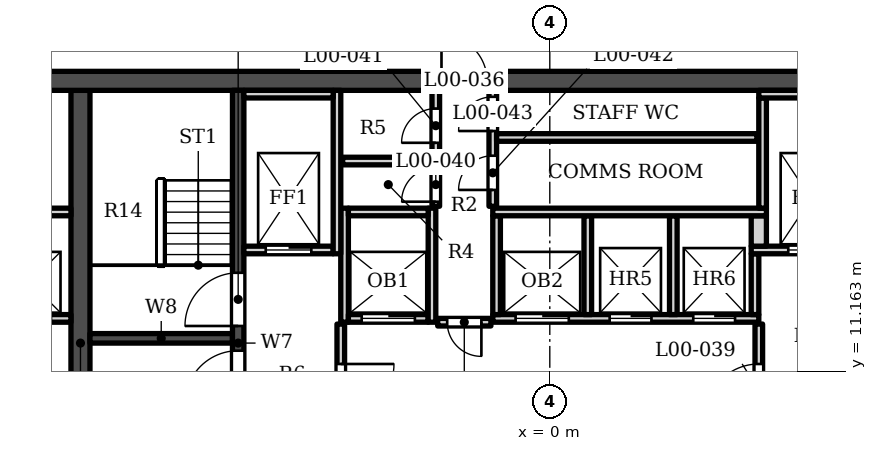
"""IFC4 building model, lengths in metres.
Left out: names, types, materials, properties, quantities, classifications, styles, units other than length and angle.
Written with IfcOpenShell. Run it as: python <this file> out.ifc"""

import sys

from ifc_helpers import new_model, si_unit, direction, frame, frame_2d, origin, place, context, subcontext, project, spatial, rectangle, extrude, element, fill, save


model = new_model("IFC4")
c1 = context("Model", 3, precision=1e-05, world=origin(), true_north=direction((0.0, 1.0)))
c2 = subcontext(c1, "Body", "Model", "MODEL_VIEW")
j1 = project(units=[si_unit("LENGTHUNIT", "METRE"), si_unit("PLANEANGLEUNIT", "RADIAN")], contexts=[c1])
p1 = place(None, origin())
s1 = spatial("IfcSite", under=j1, at=p1, CompositionType="ELEMENT")
p2 = place(p1, origin())
s2 = spatial("IfcBuilding", under=s1, at=p2, CompositionType="ELEMENT")
p3 = place(p2, origin())
s3 = spatial("IfcBuildingStorey", under=s2, at=p3, CompositionType="ELEMENT", Elevation=0.0)
p4 = place(p3, frame((-16.9, 18.802, 0.0), z_axis=(0.0, 0.0, 1.0), x_axis=(1.0, 0.0, 0.0)))
e1 = element("IfcWall", 1, at=p4, inside=s3, PredefinedType="SHEAR", context=c2, shape_type="SweptSolid", body=[
    extrude(rectangle(XDim=33.8, YDim=0.5, at=frame_2d((16.9, 0.0))), origin(), (0.0, 0.0, 1.0), 9.0),
])
p5 = place(p4, frame((14.05, 0.0, 0.0)))
e2 = element("IfcOpeningElement", 2, at=p5, cuts=e1, PredefinedType="OPENING", context=c2, shape_type="SweptSolid", body=[
    extrude(rectangle(XDim=1.2, YDim=2.1, at=frame_2d((0.6, 1.05))), frame((0.0, 0.26, 0.0), z_axis=(0.0, -1.0, 0.0), x_axis=(1.0, 0.0, 0.0)), (0.0, 0.0, 1.0), 0.52),
])
p6 = place(p3, frame((-12.35, 5.253, 0.0), z_axis=(0.0, 0.0, 1.0), x_axis=(0.0, 1.0, 0.0)))
e3 = element("IfcWall", 3, at=p6, inside=s3, PredefinedType="SHEAR", context=c2, shape_type="SweptSolid", body=[
    extrude(rectangle(XDim=13.3, YDim=0.5, at=frame_2d((6.65, 0.0))), origin(), (0.0, 0.0, 1.0), 9.0),
])
p7 = place(p3, frame((-8.2, 5.253, 0.0), z_axis=(0.0, 0.0, 1.0), x_axis=(0.0, 1.0, 0.0)))
e4 = element("IfcWall", 4, at=p7, inside=s3, PredefinedType="SHEAR", context=c2, shape_type="SweptSolid", body=[
    extrude(rectangle(XDim=13.3, YDim=0.3, at=frame_2d((6.65, 0.0))), origin(), (0.0, 0.0, 1.0), 9.0),
])
p8 = place(p7, frame((7.1, 0.0, 0.0)))
e5 = element("IfcOpeningElement", 5, at=p8, cuts=e4, PredefinedType="OPENING", context=c2, shape_type="SweptSolid", body=[
    extrude(rectangle(XDim=1.4, YDim=2.1, at=frame_2d((0.7, 1.05))), frame((0.0, 0.16, 0.0), z_axis=(0.0, -1.0, 0.0), x_axis=(1.0, 0.0, 0.0)), (0.0, 0.0, 1.0), 0.32),
])
p9 = place(p7, frame((5.05, 0.0, 0.0)))
e6 = element("IfcOpeningElement", 6, at=p9, cuts=e4, PredefinedType="OPENING", context=c2, shape_type="SweptSolid", body=[
    extrude(rectangle(XDim=1.4, YDim=2.1, at=frame_2d((0.7, 1.05))), frame((0.0, 0.16, 0.0), z_axis=(0.0, -1.0, 0.0), x_axis=(1.0, 0.0, 0.0)), (0.0, 0.0, 1.0), 0.32),
])
p10 = place(p3, frame((-12.1, 12.028, 0.0), z_axis=(0.0, 0.0, 1.0), x_axis=(1.0, 0.0, 0.0)))
e7 = element("IfcWall", 7, at=p10, inside=s3, PredefinedType="SHEAR", context=c2, shape_type="SweptSolid", body=[
    extrude(rectangle(XDim=3.75, YDim=0.25, at=frame_2d((1.875, 0.0))), origin(), (0.0, 0.0, 1.0), 9.0),
])
p11 = place(p3, frame((-5.5, 9.103, 0.0), z_axis=(0.0, 0.0, 1.0), x_axis=(0.0, 1.0, 0.0)))
e8 = element("IfcWall", 8, at=p11, inside=s3, PredefinedType="SOLIDWALL", context=c2, shape_type="SweptSolid", body=[
    extrude(rectangle(XDim=3.3, YDim=0.2, at=frame_2d((1.65, 0.0))), origin(), (0.0, 0.0, 1.0), 8.5),
])
p12 = place(p11, frame((0.85, 0.0, 0.0)))
e9 = element("IfcOpeningElement", 9, at=p12, cuts=e8, PredefinedType="OPENING", context=c2, shape_type="SweptSolid", body=[
    extrude(rectangle(XDim=1.4, YDim=2.1, at=frame_2d((0.7, 1.05))), frame((0.0, 0.11, 0.0), z_axis=(0.0, -1.0, 0.0), x_axis=(1.0, 0.0, 0.0)), (0.0, 0.0, 1.0), 0.22),
])
p13 = place(p3, frame((5.5, 9.103, 0.0), z_axis=(0.0, 0.0, 1.0), x_axis=(0.0, 1.0, 0.0)))
e10 = element("IfcWall", 10, at=p13, inside=s3, PredefinedType="SOLIDWALL", context=c2, shape_type="SweptSolid", body=[
    extrude(rectangle(XDim=3.3, YDim=0.2, at=frame_2d((1.65, 0.0))), origin(), (0.0, 0.0, 1.0), 8.5),
])
p14 = place(p13, frame((0.85, 0.0, 0.0)))
e11 = element("IfcOpeningElement", 11, at=p14, cuts=e10, PredefinedType="OPENING", context=c2, shape_type="SweptSolid", body=[
    extrude(rectangle(XDim=1.4, YDim=2.1, at=frame_2d((0.7, 1.05))), frame((0.0, 0.11, 0.0), z_axis=(0.0, -1.0, 0.0), x_axis=(1.0, 0.0, 0.0)), (0.0, 0.0, 1.0), 0.22),
])
p15 = place(p3, frame((-2.95, 12.453, 0.0), z_axis=(0.0, 0.0, 1.0), x_axis=(1.0, 0.0, 0.0)))
e12 = element("IfcWall", 12, at=p15, inside=s3, PredefinedType="SOLIDWALL", context=c2, shape_type="SweptSolid", body=[
    extrude(rectangle(XDim=1.4, YDim=0.2, at=frame_2d((0.7, 0.0))), origin(), (0.0, 0.0, 1.0), 8.5),
])
p16 = place(p15, frame((0.25, 0.0, 0.0)))
e13 = element("IfcOpeningElement", 13, at=p16, cuts=e12, PredefinedType="OPENING", context=c2, shape_type="SweptSolid", body=[
    extrude(rectangle(XDim=0.9, YDim=2.1, at=frame_2d((0.45, 1.05))), frame((0.0, 0.11, 0.0), z_axis=(0.0, -1.0, 0.0), x_axis=(1.0, 0.0, 0.0)), (0.0, 0.0, 1.0), 0.22),
])
p17 = place(p3, frame((-16.9, 12.552, 0.0), z_axis=(0.0, 0.0, 1.0), x_axis=(1.0, 0.0, 0.0)))
e14 = element("IfcWall", 14, at=p17, inside=s3, PredefinedType="SOLIDWALL", context=c2, shape_type="SweptSolid", body=[
    extrude(rectangle(XDim=4.3, YDim=0.2, at=frame_2d((2.15, 0.0))), origin(), (0.0, 0.0, 1.0), 8.5),
])
p18 = place(p17, frame((2.675, 0.0, 0.0)))
e15 = element("IfcOpeningElement", 15, at=p18, cuts=e14, PredefinedType="OPENING", context=c2, shape_type="SweptSolid", body=[
    extrude(rectangle(XDim=1.1, YDim=2.1, at=frame_2d((0.55, 1.05))), frame((0.0, 0.11, 0.0), z_axis=(0.0, -1.0, 0.0), x_axis=(1.0, 0.0, 0.0)), (0.0, 0.0, 1.0), 0.22),
])
p19 = place(p17, frame((0.425, 0.0, 0.0)))
e16 = element("IfcOpeningElement", 16, at=p19, cuts=e14, PredefinedType="OPENING", context=c2, shape_type="SweptSolid", body=[
    extrude(rectangle(XDim=1.1, YDim=2.1, at=frame_2d((0.55, 1.05))), frame((0.0, 0.11, 0.0), z_axis=(0.0, -1.0, 0.0), x_axis=(1.0, 0.0, 0.0)), (0.0, 0.0, 1.0), 0.22),
])
p20 = place(p3, frame((-5.4, 12.453, 0.0), z_axis=(0.0, 0.0, 1.0), x_axis=(0.0, 1.0, 0.0)))
e17 = element("IfcWall", 17, at=p20, inside=s3, PredefinedType="SOLIDWALL", context=c2, shape_type="SweptSolid", body=[
    extrude(rectangle(XDim=3.0, YDim=0.2, at=frame_2d((1.5, 0.0))), origin(), (0.0, 0.0, 1.0), 8.5),
])
p21 = place(p3, frame((-5.3, 12.552, 0.0), z_axis=(0.0, 0.0, 1.0), x_axis=(1.0, 0.0, 0.0)))
e18 = element("IfcWall", 18, at=p21, inside=s3, PredefinedType="SOLIDWALL", context=c2, shape_type="SweptSolid", body=[
    extrude(rectangle(XDim=2.1, YDim=0.2, at=frame_2d((1.05, 0.0))), origin(), (0.0, 0.0, 1.0), 8.5),
])
p22 = place(p21, frame((0.35, 0.0, 0.0)))
e19 = element("IfcOpeningElement", 19, at=p22, cuts=e18, PredefinedType="OPENING", context=c2, shape_type="SweptSolid", body=[
    extrude(rectangle(XDim=1.4, YDim=2.4, at=frame_2d((0.7, 1.2))), frame((0.0, 0.11, 0.0), z_axis=(0.0, -1.0, 0.0), x_axis=(1.0, 0.0, 0.0)), (0.0, 0.0, 1.0), 0.22),
])
p23 = place(p3, frame((-3.1, 12.453, 0.0), z_axis=(0.0, 0.0, 1.0), x_axis=(0.0, 1.0, 0.0)))
e20 = element("IfcWall", 20, at=p23, inside=s3, PredefinedType="SOLIDWALL", context=c2, shape_type="SweptSolid", body=[
    extrude(rectangle(XDim=3.0, YDim=0.2, at=frame_2d((1.5, 0.0))), origin(), (0.0, 0.0, 1.0), 8.5),
])
p24 = place(p3, frame((-1.5, 12.552, 0.0), z_axis=(0.0, 0.0, 1.0), x_axis=(1.0, 0.0, 0.0)))
e21 = element("IfcWall", 21, at=p24, inside=s3, PredefinedType="SOLIDWALL", context=c2, shape_type="SweptSolid", body=[
    extrude(rectangle(XDim=7.0, YDim=0.2, at=frame_2d((3.5, 0.0))), origin(), (0.0, 0.0, 1.0), 8.5),
])
p25 = place(p24, frame((0.6, 0.0, 0.0)))
e22 = element("IfcOpeningElement", 22, at=p25, cuts=e21, PredefinedType="OPENING", context=c2, shape_type="SweptSolid", body=[
    extrude(rectangle(XDim=1.4, YDim=2.4, at=frame_2d((0.7, 1.2))), frame((0.0, 0.11, 0.0), z_axis=(0.0, -1.0, 0.0), x_axis=(1.0, 0.0, 0.0)), (0.0, 0.0, 1.0), 0.22),
])
p26 = place(p24, frame((3.075, 0.0, 0.0)))
e23 = element("IfcOpeningElement", 23, at=p26, cuts=e21, PredefinedType="OPENING", context=c2, shape_type="SweptSolid", body=[
    extrude(rectangle(XDim=1.1, YDim=2.1, at=frame_2d((0.55, 1.05))), frame((0.0, 0.11, 0.0), z_axis=(0.0, -1.0, 0.0), x_axis=(1.0, 0.0, 0.0)), (0.0, 0.0, 1.0), 0.22),
])
p27 = place(p24, frame((5.275, 0.0, 0.0)))
e24 = element("IfcOpeningElement", 24, at=p27, cuts=e21, PredefinedType="OPENING", context=c2, shape_type="SweptSolid", body=[
    extrude(rectangle(XDim=1.1, YDim=2.1, at=frame_2d((0.55, 1.05))), frame((0.0, 0.11, 0.0), z_axis=(0.0, -1.0, 0.0), x_axis=(1.0, 0.0, 0.0)), (0.0, 0.0, 1.0), 0.22),
])
for number, where, z_axis, x_axis in (
    (25, (-1.4, 12.653, 0.0), (0.0, 0.0, 1.0), (0.0, 1.0, 0.0)),
    (26, (1.0, 12.653, 0.0), (0.0, 0.0, 1.0), (0.0, 1.0, 0.0)),
    (27, (3.25, 12.653, 0.0), (0.0, 0.0, 1.0), (0.0, 1.0, 0.0)),
):
    element("IfcWall", number, at=place(p3, frame(where, z_axis=z_axis, x_axis=x_axis)), inside=s3, PredefinedType="SOLIDWALL", context=c2, shape_type="SweptSolid", body=[
        extrude(rectangle(XDim=2.6, YDim=0.2, at=frame_2d((1.3, 0.0))), origin(), (0.0, 0.0, 1.0), 8.5),
    ])
p28 = place(p3, frame((5.4, 12.653, 0.0), z_axis=(0.0, 0.0, 1.0), x_axis=(0.0, 1.0, 0.0)))
e28 = element("IfcWall", 28, at=p28, inside=s3, PredefinedType="SOLIDWALL", context=c2, shape_type="SweptSolid", body=[
    extrude(rectangle(XDim=1.6, YDim=0.2, at=frame_2d((0.8, 0.0))), origin(), (0.0, 0.0, 1.0), 8.5),
])
p29 = place(p3, frame((-8.05, 14.353, 0.0), z_axis=(0.0, 0.0, 1.0), x_axis=(1.0, 0.0, 0.0)))
e29 = element("IfcWall", 29, at=p29, inside=s3, PredefinedType="SOLIDWALL", context=c2, shape_type="SweptSolid", body=[
    extrude(rectangle(XDim=2.35, YDim=0.2, at=frame_2d((1.175, 0.0))), origin(), (0.0, 0.0, 1.0), 8.5),
])
p30 = place(p29, frame((0.575, 0.0, 0.0)))
e30 = element("IfcOpeningElement", 30, at=p30, cuts=e29, PredefinedType="OPENING", context=c2, shape_type="SweptSolid", body=[
    extrude(rectangle(XDim=1.2, YDim=2.1, at=frame_2d((0.6, 1.05))), frame((0.0, 0.11, 0.0), z_axis=(0.0, -1.0, 0.0), x_axis=(1.0, 0.0, 0.0)), (0.0, 0.0, 1.0), 0.22),
])
p31 = place(p3, frame((-5.6, 14.253, 0.0), z_axis=(0.0, 0.0, 1.0), x_axis=(0.0, 1.0, 0.0)))
e31 = element("IfcWall", 31, at=p31, inside=s3, PredefinedType="SOLIDWALL", context=c2, shape_type="SweptSolid", body=[
    extrude(rectangle(XDim=4.3, YDim=0.2, at=frame_2d((2.15, 0.0))), origin(), (0.0, 0.0, 1.0), 8.5),
])
p32 = place(p3, frame((5.3, 14.353, 0.0), z_axis=(0.0, 0.0, 1.0), x_axis=(1.0, 0.0, 0.0)))
e32 = element("IfcWall", 32, at=p32, inside=s3, PredefinedType="SOLIDWALL", context=c2, shape_type="SweptSolid", body=[
    extrude(rectangle(XDim=2.75, YDim=0.2, at=frame_2d((1.375, 0.0))), origin(), (0.0, 0.0, 1.0), 8.5),
])
p33 = place(p32, frame((0.975, 0.0, 0.0)))
e33 = element("IfcOpeningElement", 33, at=p33, cuts=e32, PredefinedType="OPENING", context=c2, shape_type="SweptSolid", body=[
    extrude(rectangle(XDim=1.2, YDim=2.1, at=frame_2d((0.6, 1.05))), frame((0.0, 0.11, 0.0), z_axis=(0.0, -1.0, 0.0), x_axis=(1.0, 0.0, 0.0)), (0.0, 0.0, 1.0), 0.22),
])
p34 = place(p3, frame((5.5, 14.453, 0.0), z_axis=(0.0, 0.0, 1.0), x_axis=(0.0, 1.0, 0.0)))
e34 = element("IfcWall", 34, at=p34, inside=s3, PredefinedType="SOLIDWALL", context=c2, shape_type="SweptSolid", body=[
    extrude(rectangle(XDim=0.8, YDim=0.4, at=frame_2d((0.4, 0.0))), origin(), (0.0, 0.0, 1.0), 8.5),
])
p35 = place(p3, frame((-16.9, 15.353, 0.0), z_axis=(0.0, 0.0, 1.0), x_axis=(1.0, 0.0, 0.0)))
e35 = element("IfcWall", 35, at=p35, inside=s3, PredefinedType="SOLIDWALL", context=c2, shape_type="SweptSolid", body=[
    extrude(rectangle(XDim=4.3, YDim=0.2, at=frame_2d((2.15, 0.0))), origin(), (0.0, 0.0, 1.0), 8.5),
])
p36 = place(p3, frame((-5.3, 15.353, 0.0), z_axis=(0.0, 0.0, 1.0), x_axis=(1.0, 0.0, 0.0)))
e36 = element("IfcWall", 36, at=p36, inside=s3, PredefinedType="SOLIDWALL", context=c2, shape_type="SweptSolid", body=[
    extrude(rectangle(XDim=2.1, YDim=0.2, at=frame_2d((1.05, 0.0))), origin(), (0.0, 0.0, 1.0), 8.5),
])
p37 = place(p3, frame((-1.5, 15.353, 0.0), z_axis=(0.0, 0.0, 1.0), x_axis=(1.0, 0.0, 0.0)))
e37 = element("IfcWall", 37, at=p37, inside=s3, PredefinedType="SOLIDWALL", context=c2, shape_type="SweptSolid", body=[
    extrude(rectangle(XDim=7.2, YDim=0.2, at=frame_2d((3.6, 0.0))), origin(), (0.0, 0.0, 1.0), 8.5),
])
p38 = place(p3, frame((5.6, 15.453, 0.0), z_axis=(0.0, 0.0, 1.0), x_axis=(0.0, 1.0, 0.0)))
e38 = element("IfcWall", 38, at=p38, inside=s3, PredefinedType="SOLIDWALL", context=c2, shape_type="SweptSolid", body=[
    extrude(rectangle(XDim=2.9, YDim=0.2, at=frame_2d((1.45, 0.0))), origin(), (0.0, 0.0, 1.0), 8.5),
])
p39 = place(p3, frame((-3.0, 15.503, 0.0), z_axis=(0.0, 0.0, 1.0), x_axis=(0.0, 1.0, 0.0)))
e39 = element("IfcWall", 39, at=p39, inside=s3, PredefinedType="SOLIDWALL", context=c2, shape_type="SweptSolid", body=[
    extrude(rectangle(XDim=3.05, YDim=0.2, at=frame_2d((1.525, 0.0))), origin(), (0.0, 0.0, 1.0), 8.5),
])
p40 = place(p39, frame((0.12, 0.0, 0.0)))
e40 = element("IfcOpeningElement", 40, at=p40, cuts=e39, PredefinedType="OPENING", context=c2, shape_type="SweptSolid", body=[
    extrude(rectangle(XDim=0.9, YDim=2.1, at=frame_2d((0.45, 1.05))), frame((0.0, 0.11, 0.0), z_axis=(0.0, -1.0, 0.0), x_axis=(1.0, 0.0, 0.0)), (0.0, 0.0, 1.0), 0.22),
])
p41 = place(p39, frame((1.67, 0.0, 0.0)))
e41 = element("IfcOpeningElement", 41, at=p41, cuts=e39, PredefinedType="OPENING", context=c2, shape_type="SweptSolid", body=[
    extrude(rectangle(XDim=0.9, YDim=2.1, at=frame_2d((0.45, 1.05))), frame((0.0, 0.11, 0.0), z_axis=(0.0, -1.0, 0.0), x_axis=(1.0, 0.0, 0.0)), (0.0, 0.0, 1.0), 0.22),
])
p42 = place(p3, frame((-1.5, 15.503, 0.0), z_axis=(0.0, 0.0, 1.0), x_axis=(0.0, 1.0, 0.0)))
e42 = element("IfcWall", 42, at=p42, inside=s3, PredefinedType="SOLIDWALL", context=c2, shape_type="SweptSolid", body=[
    extrude(rectangle(XDim=3.05, YDim=0.2, at=frame_2d((1.525, 0.0))), origin(), (0.0, 0.0, 1.0), 8.5),
])
p43 = place(p42, frame((0.43, 0.0, 0.0)))
e43 = element("IfcOpeningElement", 43, at=p43, cuts=e42, PredefinedType="OPENING", context=c2, shape_type="SweptSolid", body=[
    extrude(rectangle(XDim=0.9, YDim=2.1, at=frame_2d((0.45, 1.05))), frame((0.0, 0.11, 0.0), z_axis=(0.0, -1.0, 0.0), x_axis=(1.0, 0.0, 0.0)), (0.0, 0.0, 1.0), 0.22),
])
p44 = place(p42, frame((1.98, 0.0, 0.0)))
e44 = element("IfcOpeningElement", 44, at=p44, cuts=e42, PredefinedType="OPENING", context=c2, shape_type="SweptSolid", body=[
    extrude(rectangle(XDim=0.9, YDim=2.1, at=frame_2d((0.45, 1.05))), frame((0.0, 0.11, 0.0), z_axis=(0.0, -1.0, 0.0), x_axis=(1.0, 0.0, 0.0)), (0.0, 0.0, 1.0), 0.22),
])
p45 = place(p3, frame((-5.45, 16.693, 0.0), z_axis=(0.0, 0.0, 1.0), x_axis=(1.0, 0.0, 0.0)))
e45 = element("IfcWall", 45, at=p45, inside=s3, PredefinedType="SOLIDWALL", context=c2, shape_type="SweptSolid", body=[
    extrude(rectangle(XDim=2.35, YDim=0.2, at=frame_2d((1.175, 0.0))), origin(), (0.0, 0.0, 1.0), 8.5),
])
p46 = place(p3, frame((-1.4, 17.312, 0.0), z_axis=(0.0, 0.0, 1.0), x_axis=(1.0, 0.0, 0.0)))
e46 = element("IfcWall", 46, at=p46, inside=s3, PredefinedType="SOLIDWALL", context=c2, shape_type="SweptSolid", body=[
    extrude(rectangle(XDim=6.85, YDim=0.2, at=frame_2d((3.425, 0.0))), origin(), (0.0, 0.0, 1.0), 8.5),
])
p47 = place(p3, frame((-8.05, 18.453, 0.0), z_axis=(0.0, 0.0, 1.0), x_axis=(1.0, 0.0, 0.0)))
e47 = element("IfcWall", 47, at=p47, inside=s3, PredefinedType="SOLIDWALL", context=c2, shape_type="SweptSolid", body=[
    extrude(rectangle(XDim=2.35, YDim=0.2, at=frame_2d((1.175, 0.0))), origin(), (0.0, 0.0, 1.0), 8.5),
])
p48 = place(p3, frame((5.5, 18.453, 0.0), z_axis=(0.0, 0.0, 1.0), x_axis=(1.0, 0.0, 0.0)))
e48 = element("IfcWall", 48, at=p48, inside=s3, PredefinedType="SOLIDWALL", context=c2, shape_type="SweptSolid", body=[
    extrude(rectangle(XDim=2.55, YDim=0.2, at=frame_2d((1.275, 0.0))), origin(), (0.0, 0.0, 1.0), 8.5),
])
p49 = place(p22, origin())
e49 = element("IfcDoor", 49, at=p49, inside=s3, OperationType="DOUBLE_DOOR_SLIDING", PredefinedType="DOOR", context=c2, shape_type="SweptSolid", body=[
    extrude(rectangle(XDim=1.4, YDim=2.4, at=frame_2d((0.7, 1.2))), frame((0.0, 0.025, 0.0), z_axis=(0.0, -1.0, 0.0), x_axis=(1.0, 0.0, 0.0)), (0.0, 0.0, 1.0), 0.05),
])
fill(e19, e49)
p50 = place(p25, origin())
e50 = element("IfcDoor", 50, at=p50, inside=s3, OperationType="DOUBLE_DOOR_SLIDING", PredefinedType="DOOR", context=c2, shape_type="SweptSolid", body=[
    extrude(rectangle(XDim=1.4, YDim=2.4, at=frame_2d((0.7, 1.2))), frame((0.0, 0.025, 0.0), z_axis=(0.0, -1.0, 0.0), x_axis=(1.0, 0.0, 0.0)), (0.0, 0.0, 1.0), 0.05),
])
fill(e22, e50)
p51 = place(p26, origin())
e51 = element("IfcDoor", 51, at=p51, inside=s3, OperationType="DOUBLE_DOOR_SLIDING", PredefinedType="DOOR", context=c2, shape_type="SweptSolid", body=[
    extrude(rectangle(XDim=1.1, YDim=2.1, at=frame_2d((0.55, 1.05))), frame((0.0, 0.025, 0.0), z_axis=(0.0, -1.0, 0.0), x_axis=(1.0, 0.0, 0.0)), (0.0, 0.0, 1.0), 0.05),
])
fill(e23, e51)
p52 = place(p27, origin())
e52 = element("IfcDoor", 52, at=p52, inside=s3, OperationType="DOUBLE_DOOR_SLIDING", PredefinedType="DOOR", context=c2, shape_type="SweptSolid", body=[
    extrude(rectangle(XDim=1.1, YDim=2.1, at=frame_2d((0.55, 1.05))), frame((0.0, 0.025, 0.0), z_axis=(0.0, -1.0, 0.0), x_axis=(1.0, 0.0, 0.0)), (0.0, 0.0, 1.0), 0.05),
])
fill(e24, e52)
p53 = place(p30, origin())
e53 = element("IfcDoor", 53, at=p53, inside=s3, OperationType="DOUBLE_DOOR_SLIDING", PredefinedType="DOOR", context=c2, shape_type="SweptSolid", body=[
    extrude(rectangle(XDim=1.2, YDim=2.1, at=frame_2d((0.6, 1.05))), frame((0.0, 0.025, 0.0), z_axis=(0.0, -1.0, 0.0), x_axis=(1.0, 0.0, 0.0)), (0.0, 0.0, 1.0), 0.05),
])
fill(e30, e53)
p54 = place(p33, origin())
e54 = element("IfcDoor", 54, at=p54, inside=s3, OperationType="DOUBLE_DOOR_SLIDING", PredefinedType="DOOR", context=c2, shape_type="SweptSolid", body=[
    extrude(rectangle(XDim=1.2, YDim=2.1, at=frame_2d((0.6, 1.05))), frame((0.0, 0.025, 0.0), z_axis=(0.0, -1.0, 0.0), x_axis=(1.0, 0.0, 0.0)), (0.0, 0.0, 1.0), 0.05),
])
fill(e33, e54)
p55 = place(p8, origin())
e55 = element("IfcDoor", 55, at=p55, inside=s3, OperationType="SINGLE_SWING_LEFT", PredefinedType="DOOR", context=c2, shape_type="SweptSolid", body=[
    extrude(rectangle(XDim=1.4, YDim=2.1, at=frame_2d((0.7, 1.05))), frame((0.0, 0.025, 0.0), z_axis=(0.0, -1.0, 0.0), x_axis=(1.0, 0.0, 0.0)), (0.0, 0.0, 1.0), 0.05),
])
fill(e5, e55)
p56 = place(p9, origin())
e56 = element("IfcDoor", 56, at=p56, inside=s3, OperationType="SINGLE_SWING_LEFT", PredefinedType="DOOR", context=c2, shape_type="SweptSolid", body=[
    extrude(rectangle(XDim=1.4, YDim=2.1, at=frame_2d((0.7, 1.05))), frame((0.0, 0.025, 0.0), z_axis=(0.0, -1.0, 0.0), x_axis=(1.0, 0.0, 0.0)), (0.0, 0.0, 1.0), 0.05),
])
fill(e6, e56)
p57 = place(p5, origin())
e57 = element("IfcDoor", 57, at=p57, inside=s3, OperationType="SINGLE_SWING_LEFT", PredefinedType="DOOR", context=c2, shape_type="SweptSolid", body=[
    extrude(rectangle(XDim=1.2, YDim=2.1, at=frame_2d((0.6, 1.05))), frame((0.0, 0.025, 0.0), z_axis=(0.0, -1.0, 0.0), x_axis=(1.0, 0.0, 0.0)), (0.0, 0.0, 1.0), 0.05),
])
fill(e2, e57)
p58 = place(p16, origin())
e58 = element("IfcDoor", 58, at=p58, inside=s3, OperationType="SINGLE_SWING_RIGHT", PredefinedType="DOOR", context=c2, shape_type="SweptSolid", body=[
    extrude(rectangle(XDim=0.9, YDim=2.1, at=frame_2d((0.45, 1.05))), frame((0.0, 0.025, 0.0), z_axis=(0.0, -1.0, 0.0), x_axis=(1.0, 0.0, 0.0)), (0.0, 0.0, 1.0), 0.05),
])
fill(e13, e58)
p59 = place(p12, origin())
e59 = element("IfcDoor", 59, at=p59, inside=s3, OperationType="SINGLE_SWING_RIGHT", PredefinedType="DOOR", context=c2, shape_type="SweptSolid", body=[
    extrude(rectangle(XDim=1.4, YDim=2.1, at=frame_2d((0.7, 1.05))), frame((0.0, 0.025, 0.0), z_axis=(0.0, -1.0, 0.0), x_axis=(1.0, 0.0, 0.0)), (0.0, 0.0, 1.0), 0.05),
])
fill(e9, e59)
p60 = place(p14, origin())
e60 = element("IfcDoor", 60, at=p60, inside=s3, OperationType="SINGLE_SWING_LEFT", PredefinedType="DOOR", context=c2, shape_type="SweptSolid", body=[
    extrude(rectangle(XDim=1.4, YDim=2.1, at=frame_2d((0.7, 1.05))), frame((0.0, 0.025, 0.0), z_axis=(0.0, -1.0, 0.0), x_axis=(1.0, 0.0, 0.0)), (0.0, 0.0, 1.0), 0.05),
])
fill(e11, e60)
p61 = place(p40, origin())
e61 = element("IfcDoor", 61, at=p61, inside=s3, OperationType="SINGLE_SWING_LEFT", PredefinedType="DOOR", context=c2, shape_type="SweptSolid", body=[
    extrude(rectangle(XDim=0.9, YDim=2.1, at=frame_2d((0.45, 1.05))), frame((0.0, 0.025, 0.0), z_axis=(0.0, -1.0, 0.0), x_axis=(1.0, 0.0, 0.0)), (0.0, 0.0, 1.0), 0.05),
])
fill(e40, e61)
p62 = place(p41, origin())
e62 = element("IfcDoor", 62, at=p62, inside=s3, OperationType="SINGLE_SWING_LEFT", PredefinedType="DOOR", context=c2, shape_type="SweptSolid", body=[
    extrude(rectangle(XDim=0.9, YDim=2.1, at=frame_2d((0.45, 1.05))), frame((0.0, 0.025, 0.0), z_axis=(0.0, -1.0, 0.0), x_axis=(1.0, 0.0, 0.0)), (0.0, 0.0, 1.0), 0.05),
])
fill(e41, e62)
p63 = place(p43, origin())
e63 = element("IfcDoor", 63, at=p63, inside=s3, OperationType="SINGLE_SWING_LEFT", PredefinedType="DOOR", context=c2, shape_type="SweptSolid", body=[
    extrude(rectangle(XDim=0.9, YDim=2.1, at=frame_2d((0.45, 1.05))), frame((0.0, 0.025, 0.0), z_axis=(0.0, -1.0, 0.0), x_axis=(1.0, 0.0, 0.0)), (0.0, 0.0, 1.0), 0.05),
])
fill(e43, e63)
p64 = place(p44, origin())
e64 = element("IfcDoor", 64, at=p64, inside=s3, OperationType="SINGLE_SWING_LEFT", PredefinedType="DOOR", context=c2, shape_type="SweptSolid", body=[
    extrude(rectangle(XDim=0.9, YDim=2.1, at=frame_2d((0.45, 1.05))), frame((0.0, 0.025, 0.0), z_axis=(0.0, -1.0, 0.0), x_axis=(1.0, 0.0, 0.0)), (0.0, 0.0, 1.0), 0.05),
])
fill(e44, e64)
save(model, sys.argv[1])
